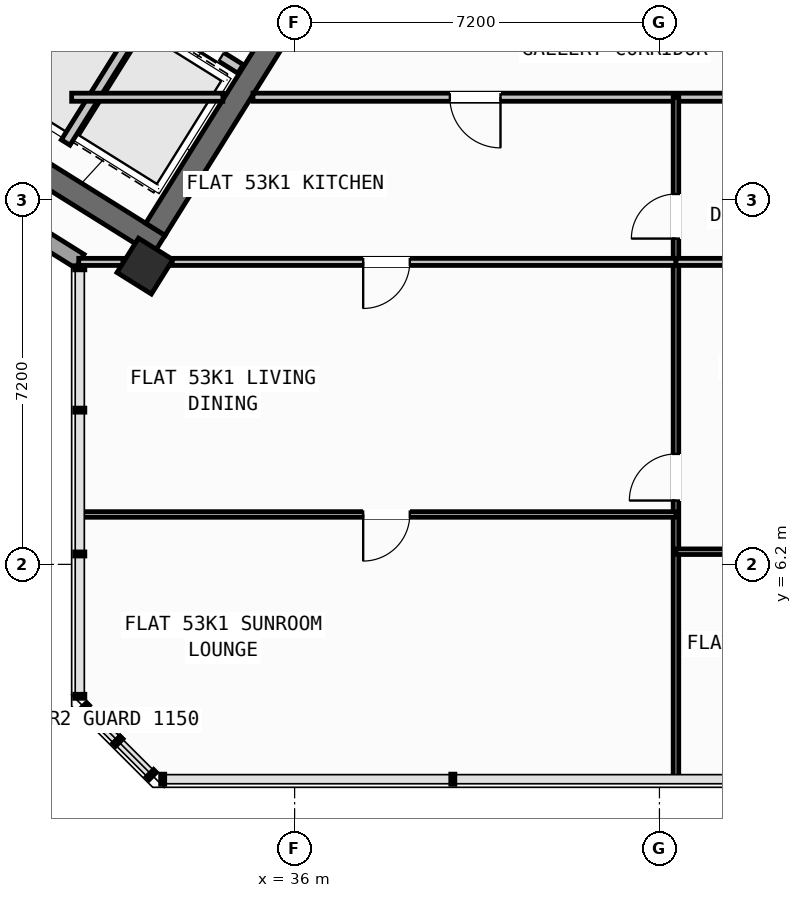
"""IFC4 building model, lengths in metres.
Left out: names, types, materials, properties, quantities, classifications, styles, units other than length and angle.
Written with IfcOpenShell. Run it as: python <this file> out.ifc"""

import sys

from ifc_helpers import new_model, si_unit, direction, frame, frame_2d, origin, origin_2d, place, context, subcontext, project, spatial, rectangle, hollow_rectangle, extrude, source, transform, mapped, element, fill, save


model = new_model("IFC4")
c1 = context("Model", 3, precision=1e-05, world=origin(), true_north=direction((0.0, 1.0)))
c2 = subcontext(c1, "Body", "Model", "MODEL_VIEW")
j1 = project(units=[si_unit("LENGTHUNIT", "METRE"), si_unit("PLANEANGLEUNIT", "RADIAN")], contexts=[c1])
p1 = place(None, origin())
s1 = spatial("IfcSite", under=j1, at=p1, CompositionType="ELEMENT")
p2 = place(p1, origin())
s2 = spatial("IfcBuilding", under=s1, at=p2, CompositionType="ELEMENT")
p3 = place(p2, frame((0.0, 0.0, 211.2)))
s3 = spatial("IfcBuildingStorey", under=s2, at=p3, CompositionType="ELEMENT", Elevation=211.2)
p4 = place(p3, frame((33.324, 12.503, 0.0), z_axis=(0.0, 0.0, 1.0), x_axis=(-0.848043529849, 0.529926571782, 0.0)))
e1 = element("IfcWall", 1, at=p4, inside=s3, PredefinedType="SHEAR", context=c2, shape_type="SweptSolid", body=[
    extrude(rectangle(XDim=13.04, YDim=0.45, at=frame_2d((6.52, 0.0))), origin(), (0.0, 0.0, 1.0), 3.35),
])
p5 = place(p3, frame((36.683, 18.304, 0.0), z_axis=(0.0, 0.0, 1.0), x_axis=(-0.529904039071, -0.848057609704, 0.0)))
e2 = element("IfcWall", 2, at=p5, inside=s3, PredefinedType="SHEAR", context=c2, shape_type="SweptSolid", body=[
    extrude(rectangle(XDim=6.475, YDim=0.45, at=frame_2d((3.238, 0.0))), origin(), (0.0, 0.0, 1.0), 3.35),
])
m1 = source(origin(), c2, "Body", "SweptSolid", [
    extrude(hollow_rectangle(XDim=0.8, YDim=0.8, WallThickness=0.032, at=origin_2d()), origin(), (0.0, 0.0, 1.0), 3.6),
])
p6 = place(p3, frame((33.046, 12.087, 0.0), z_axis=(0.0, 0.0, 1.0), x_axis=(-0.848048096156, 0.529919264233, 0.0)))
e3 = element("IfcColumn", 3, at=p6, inside=s3, PredefinedType="COLUMN", context=c2, shape_type="MappedRepresentation", body=[
    mapped(m1, transform((0.0, 0.0, 0.0), scale=1.0)),
])
p7 = place(p3, frame((31.76, 12.183, 0.0), z_axis=(0.0, 0.0, 1.0), x_axis=(-0.848047074256, 0.529920899612, 0.0)))
e4 = element("IfcWall", 4, at=p7, inside=s3, PredefinedType="STANDARD", context=c2, shape_type="SweptSolid", body=[
    extrude(rectangle(XDim=30.652, YDim=0.32, at=frame_2d((15.326, 0.0))), origin(), (0.0, 0.0, 1.0), 3.35),
])
p8 = place(p7, frame((15.166, 0.0, 0.0)))
e5 = element("IfcOpeningElement", 5, at=p8, cuts=e4, PredefinedType="OPENING", context=c2, shape_type="SweptSolid", body=[
    extrude(rectangle(XDim=1.2, YDim=2.15, at=frame_2d((0.6, 1.075))), frame((0.0, 0.17, 0.0), z_axis=(0.0, -1.0, 0.0), x_axis=(1.0, 0.0, 0.0)), (0.0, 0.0, 1.0), 0.34),
])
p9 = place(p7, frame((2.24, 0.0, 0.9)))
e6 = element("IfcOpeningElement", 6, at=p9, cuts=e4, PredefinedType="OPENING", context=c2, shape_type="SweptSolid", body=[
    extrude(rectangle(XDim=1.65, YDim=1.45, at=frame_2d((0.825, 0.725))), frame((0.0, 0.17, 0.0), z_axis=(0.0, -1.0, 0.0), x_axis=(1.0, 0.0, 0.0)), (0.0, 0.0, 1.0), 0.34),
])
p10 = place(p7, frame((7.469, 0.0, 0.9)))
e7 = element("IfcOpeningElement", 7, at=p10, cuts=e4, PredefinedType="OPENING", context=c2, shape_type="SweptSolid", body=[
    extrude(rectangle(XDim=1.65, YDim=1.45, at=frame_2d((0.825, 0.725))), frame((0.0, 0.17, 0.0), z_axis=(0.0, -1.0, 0.0), x_axis=(1.0, 0.0, 0.0)), (0.0, 0.0, 1.0), 0.34),
])
p11 = place(p7, frame((12.623, 0.0, 1.0)))
e8 = element("IfcOpeningElement", 8, at=p11, cuts=e4, PredefinedType="OPENING", context=c2, shape_type="SweptSolid", body=[
    extrude(rectangle(XDim=0.9, YDim=1.25, at=frame_2d((0.45, 0.625))), frame((0.0, 0.17, 0.0), z_axis=(0.0, -1.0, 0.0), x_axis=(1.0, 0.0, 0.0)), (0.0, 0.0, 1.0), 0.34),
])
p12 = place(p7, frame((19.715, 0.0, 1.0)))
e9 = element("IfcOpeningElement", 9, at=p12, cuts=e4, PredefinedType="OPENING", context=c2, shape_type="SweptSolid", body=[
    extrude(rectangle(XDim=0.9, YDim=1.25, at=frame_2d((0.45, 0.625))), frame((0.0, 0.17, 0.0), z_axis=(0.0, -1.0, 0.0), x_axis=(1.0, 0.0, 0.0)), (0.0, 0.0, 1.0), 0.34),
])
p13 = place(p7, frame((25.566, 0.0, 0.9)))
e10 = element("IfcOpeningElement", 10, at=p13, cuts=e4, PredefinedType="OPENING", context=c2, shape_type="SweptSolid", body=[
    extrude(rectangle(XDim=1.65, YDim=1.45, at=frame_2d((0.825, 0.725))), frame((0.0, 0.17, 0.0), z_axis=(0.0, -1.0, 0.0), x_axis=(1.0, 0.0, 0.0)), (0.0, 0.0, 1.0), 0.34),
])
p14 = place(p7, frame((28.896, 0.0, 1.0)))
e11 = element("IfcOpeningElement", 11, at=p14, cuts=e4, PredefinedType="OPENING", context=c2, shape_type="SweptSolid", body=[
    extrude(rectangle(XDim=0.9, YDim=1.25, at=frame_2d((0.45, 0.625))), frame((0.0, 0.17, 0.0), z_axis=(0.0, -1.0, 0.0), x_axis=(1.0, 0.0, 0.0)), (0.0, 0.0, 1.0), 0.34),
])
p15 = place(p3, frame((31.288, 18.256, 0.0), z_axis=(0.0, 0.0, 1.0), x_axis=(-0.529943379326, -0.848033026897, 0.0)))
e12 = element("IfcWall", 12, at=p15, inside=s3, PredefinedType="SHEAR", context=c2, shape_type="SweptSolid", body=[
    extrude(rectangle(XDim=3.16, YDim=0.26, at=frame_2d((1.58, 0.0))), origin(), (0.0, 0.0, 1.0), 3.35),
])
p16 = place(p3, frame((34.933, 15.978, 0.0), z_axis=(0.0, 0.0, 1.0), x_axis=(-0.848055739377, 0.529907032327, 0.0)))
e13 = element("IfcWall", 13, at=p16, inside=s3, PredefinedType="STANDARD", context=c2, shape_type="SweptSolid", body=[
    extrude(rectangle(XDim=4.298, YDim=0.2, at=frame_2d((2.149, 0.0))), origin(), (0.0, 0.0, 1.0), 3.34),
])
p17 = place(p16, frame((0.448, 0.0, 0.0)))
e14 = element("IfcOpeningElement", 14, at=p17, cuts=e13, PredefinedType="OPENING", context=c2, shape_type="SweptSolid", body=[
    extrude(rectangle(XDim=1.3, YDim=2.2, at=frame_2d((0.65, 1.1))), frame((0.0, 0.11, 0.0), z_axis=(0.0, -1.0, 0.0), x_axis=(1.0, 0.0, 0.0)), (0.0, 0.0, 1.0), 0.22),
])
p18 = place(p16, frame((2.523, 0.0, 0.0)))
e15 = element("IfcOpeningElement", 15, at=p18, cuts=e13, PredefinedType="OPENING", context=c2, shape_type="SweptSolid", body=[
    extrude(rectangle(XDim=1.45, YDim=2.25, at=frame_2d((0.725, 1.125))), frame((0.0, 0.11, 0.0), z_axis=(0.0, -1.0, 0.0), x_axis=(1.0, 0.0, 0.0)), (0.0, 0.0, 1.0), 0.22),
])
p19 = place(p3, frame((33.029, 17.003, 0.0), z_axis=(0.0, 0.0, 1.0), x_axis=(-0.529916267533, -0.848049968695, 0.0)))
e16 = element("IfcWall", 16, at=p19, inside=s3, PredefinedType="STANDARD", context=c2, shape_type="SweptSolid", body=[
    extrude(rectangle(XDim=2.92, YDim=0.2, at=frame_2d((1.46, 0.0))), origin(), (0.0, 0.0, 1.0), 3.34),
])
p20 = place(p3, frame((31.6, 15.42, 0.0), z_axis=(0.0, 0.0, 1.0), x_axis=(1.0, 0.0, 0.0)))
e17 = element("IfcWall", 17, at=p20, inside=s3, PredefinedType="PARTITIONING", context=c2, shape_type="SweptSolid", body=[
    extrude(rectangle(XDim=2.984, YDim=0.16, at=frame_2d((1.492, 0.0))), origin(), (0.0, 0.0, 1.0), 3.34),
])
p21 = place(p3, frame((35.178, 15.42, 0.0), z_axis=(0.0, 0.0, 1.0), x_axis=(1.0, 0.0, 0.0)))
e18 = element("IfcWall", 18, at=p21, inside=s3, PredefinedType="PARTITIONING", context=c2, shape_type="SweptSolid", body=[
    extrude(rectangle(XDim=15.552, YDim=0.16, at=frame_2d((7.776, 0.0))), origin(), (0.0, 0.0, 1.0), 3.34),
])
p22 = place(p21, frame((3.885, 0.0, 0.0)))
e19 = element("IfcOpeningElement", 19, at=p22, cuts=e18, PredefinedType="OPENING", context=c2, shape_type="SweptSolid", body=[
    extrude(rectangle(XDim=1.0, YDim=2.1, at=frame_2d((0.5, 1.05))), frame((0.0, 0.09, 0.0), z_axis=(0.0, -1.0, 0.0), x_axis=(1.0, 0.0, 0.0)), (0.0, 0.0, 1.0), 0.18),
])
p23 = place(p3, frame((43.526, 1.96, 0.0), z_axis=(0.0, 0.0, 1.0), x_axis=(0.0, 1.0, 0.0)))
e20 = element("IfcWall", 20, at=p23, inside=s3, PredefinedType="PARTITIONING", context=c2, shape_type="SweptSolid", body=[
    extrude(rectangle(XDim=13.46, YDim=0.11, at=frame_2d((6.73, 0.0))), origin(), (0.0, 0.0, 1.0), 3.34),
])
p24 = place(p23, frame((5.5, 0.0, 0.0)))
e21 = element("IfcOpeningElement", 21, at=p24, cuts=e20, PredefinedType="OPENING", context=c2, shape_type="SweptSolid", body=[
    extrude(rectangle(XDim=0.92, YDim=2.08, at=frame_2d((0.46, 1.04))), frame((0.0, 0.065, 0.0), z_axis=(0.0, -1.0, 0.0), x_axis=(1.0, 0.0, 0.0)), (0.0, 0.0, 1.0), 0.13),
])
p25 = place(p23, frame((10.67, 0.0, 0.0)))
e22 = element("IfcOpeningElement", 22, at=p25, cuts=e20, PredefinedType="OPENING", context=c2, shape_type="SweptSolid", body=[
    extrude(rectangle(XDim=0.88, YDim=2.08, at=frame_2d((0.44, 1.04))), frame((0.0, 0.065, 0.0), z_axis=(0.0, -1.0, 0.0), x_axis=(1.0, 0.0, 0.0)), (0.0, 0.0, 1.0), 0.13),
])
p26 = place(p3, frame((31.74, 12.17, 0.0), z_axis=(0.0, 0.0, 1.0), x_axis=(1.0, 0.0, 0.0)))
e23 = element("IfcWall", 23, at=p26, inside=s3, PredefinedType="PLUMBINGWALL", context=c2, shape_type="SweptSolid", body=[
    extrude(rectangle(XDim=0.872, YDim=0.14, at=frame_2d((0.436, 0.0))), origin(), (0.0, 0.0, 1.0), 3.34),
])
p27 = place(p3, frame((33.584, 12.17, 0.0), z_axis=(0.0, 0.0, 1.0), x_axis=(1.0, 0.0, 0.0)))
e24 = element("IfcWall", 24, at=p27, inside=s3, PredefinedType="PLUMBINGWALL", context=c2, shape_type="SweptSolid", body=[
    extrude(rectangle(XDim=9.942, YDim=0.14, at=frame_2d((4.971, 0.0))), origin(), (0.0, 0.0, 1.0), 2.525),
])
p28 = place(p27, frame((3.769, 0.0, 0.0)))
e25 = element("IfcOpeningElement", 25, at=p28, cuts=e24, PredefinedType="OPENING", context=c2, shape_type="SweptSolid", body=[
    extrude(rectangle(XDim=0.92, YDim=2.08, at=frame_2d((0.46, 1.04))), frame((0.0, 0.08, 0.0), z_axis=(0.0, -1.0, 0.0), x_axis=(1.0, 0.0, 0.0)), (0.0, 0.0, 1.0), 0.16),
])
p29 = place(p3, frame((43.526, 12.17, 0.0), z_axis=(0.0, 0.0, 1.0), x_axis=(1.0, 0.0, 0.0)))
e26 = element("IfcWall", 26, at=p29, inside=s3, PredefinedType="PLUMBINGWALL", context=c2, shape_type="SweptSolid", body=[
    extrude(rectangle(XDim=8.734, YDim=0.14, at=frame_2d((4.367, 0.0))), origin(), (0.0, 0.0, 1.0), 2.525),
])
p30 = place(p3, frame((31.74, 7.185, 0.0), z_axis=(0.0, 0.0, 1.0), x_axis=(1.0, 0.0, 0.0)))
e27 = element("IfcWall", 27, at=p30, inside=s3, PredefinedType="PARTITIONING", context=c2, shape_type="SweptSolid", body=[
    extrude(rectangle(XDim=11.786, YDim=0.11, at=frame_2d((5.893, 0.0))), origin(), (0.0, 0.0, 1.0), 3.34),
])
p31 = place(p30, frame((5.613, 0.0, 0.0)))
e28 = element("IfcOpeningElement", 28, at=p31, cuts=e27, PredefinedType="OPENING", context=c2, shape_type="SweptSolid", body=[
    extrude(rectangle(XDim=0.92, YDim=2.08, at=frame_2d((0.46, 1.04))), frame((0.0, 0.065, 0.0), z_axis=(0.0, -1.0, 0.0), x_axis=(1.0, 0.0, 0.0)), (0.0, 0.0, 1.0), 0.13),
])
p32 = place(p3, frame((43.526, 6.45, 0.0), z_axis=(0.0, 0.0, 1.0), x_axis=(1.0, 0.0, 0.0)))
e29 = element("IfcWall", 29, at=p32, inside=s3, PredefinedType="PARTITIONING", context=c2, shape_type="SweptSolid", body=[
    extrude(rectangle(XDim=8.734, YDim=0.11, at=frame_2d((4.367, 0.0))), origin(), (0.0, 0.0, 1.0), 3.34),
])
p33 = place(p32, frame((3.677, 0.0, 0.0)))
e30 = element("IfcOpeningElement", 30, at=p33, cuts=e29, PredefinedType="OPENING", context=c2, shape_type="SweptSolid", body=[
    extrude(rectangle(XDim=0.92, YDim=2.08, at=frame_2d((0.46, 1.04))), frame((0.0, 0.065, 0.0), z_axis=(0.0, -1.0, 0.0), x_axis=(1.0, 0.0, 0.0)), (0.0, 0.0, 1.0), 0.13),
])
m2 = source(origin(), c2, "Body", "SweptSolid", [
    extrude(rectangle(XDim=1.3, YDim=2.2, at=frame_2d((0.65, 1.1))), frame((0.0, 0.025, 0.0), z_axis=(0.0, -1.0, 0.0), x_axis=(1.0, 0.0, 0.0)), (0.0, 0.0, 1.0), 0.05),
])
p34 = place(p17, origin())
e31 = element("IfcDoor", 31, at=p34, inside=s3, OperationType="DOUBLE_DOOR_SLIDING", PredefinedType="DOOR", context=c2, shape_type="MappedRepresentation", body=[
    mapped(m2, transform((0.0, 0.0, 0.0), scale=1.0)),
])
fill(e14, e31)
m3 = source(origin(), c2, "Body", "SweptSolid", [
    extrude(rectangle(XDim=0.92, YDim=2.08, at=frame_2d((0.46, 1.04))), frame((0.0, 0.025, 0.0), z_axis=(0.0, -1.0, 0.0), x_axis=(1.0, 0.0, 0.0)), (0.0, 0.0, 1.0), 0.05),
])
p35 = place(p31, frame((0.92, 0.0, 0.0), z_axis=(0.0, 0.0, 1.0), x_axis=(-1.0, 0.0, 0.0)))
e32 = element("IfcDoor", 32, at=p35, inside=s3, OperationType="SINGLE_SWING_RIGHT", PredefinedType="DOOR", context=c2, shape_type="MappedRepresentation", body=[
    mapped(m3, transform((0.0, 0.0, 0.0), scale=1.0)),
])
fill(e28, e32)
p36 = place(p24, origin())
e33 = element("IfcDoor", 33, at=p36, inside=s3, OperationType="SINGLE_SWING_LEFT", PredefinedType="DOOR", context=c2, shape_type="MappedRepresentation", body=[
    mapped(m3, transform((0.0, 0.0, 0.0), scale=1.0)),
])
fill(e21, e33)
m4 = source(origin(), c2, "Body", "SweptSolid", [
    extrude(rectangle(XDim=1.0, YDim=2.1, at=frame_2d((0.5, 1.05))), frame((0.0, 0.025, 0.0), z_axis=(0.0, -1.0, 0.0), x_axis=(1.0, 0.0, 0.0)), (0.0, 0.0, 1.0), 0.05),
])
p37 = place(p22, frame((1.0, 0.0, 0.0), z_axis=(0.0, 0.0, 1.0), x_axis=(-1.0, 0.0, 0.0)))
e34 = element("IfcDoor", 34, at=p37, inside=s3, OperationType="SINGLE_SWING_LEFT", PredefinedType="DOOR", context=c2, shape_type="MappedRepresentation", body=[
    mapped(m4, transform((0.0, 0.0, 0.0), scale=1.0)),
])
fill(e19, e34)
p38 = place(p28, frame((0.92, 0.0, 0.0), z_axis=(0.0, 0.0, 1.0), x_axis=(-1.0, 0.0, 0.0)))
e35 = element("IfcDoor", 35, at=p38, inside=s3, OperationType="SINGLE_SWING_RIGHT", PredefinedType="DOOR", context=c2, shape_type="MappedRepresentation", body=[
    mapped(m3, transform((0.0, 0.0, 0.0), scale=1.0)),
])
fill(e25, e35)
m5 = source(origin(), c2, "Body", "SweptSolid", [
    extrude(rectangle(XDim=0.88, YDim=2.08, at=frame_2d((0.44, 1.04))), frame((0.0, 0.025, 0.0), z_axis=(0.0, -1.0, 0.0), x_axis=(1.0, 0.0, 0.0)), (0.0, 0.0, 1.0), 0.05),
])
p39 = place(p25, origin())
e36 = element("IfcDoor", 36, at=p39, inside=s3, OperationType="SINGLE_SWING_LEFT", PredefinedType="DOOR", context=c2, shape_type="MappedRepresentation", body=[
    mapped(m5, transform((0.0, 0.0, 0.0), scale=1.0)),
])
fill(e22, e36)
save(model, sys.argv[1])
